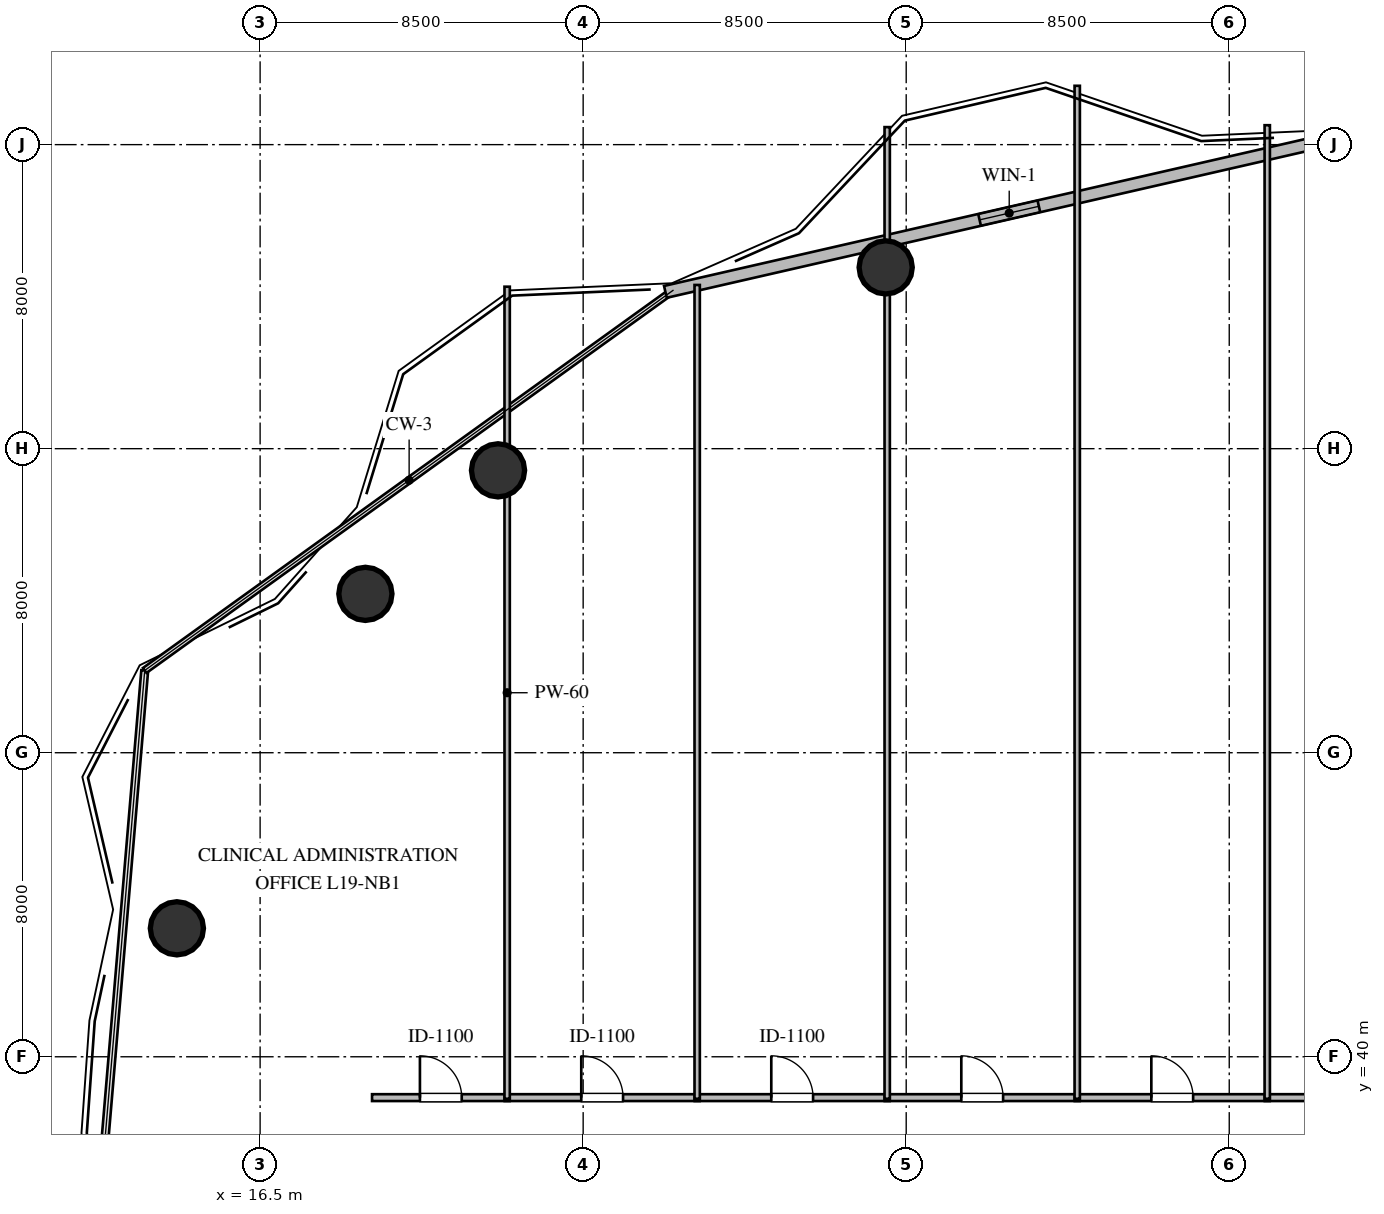
"""IFC4 building model, lengths in metres.
Left out: names, types, materials, properties, quantities, classifications, styles, units other than length and angle.
Written with IfcOpenShell. Run it as: python <this file> out.ifc"""

import sys

from ifc_helpers import new_model, si_unit, direction, frame, frame_2d, origin, origin_2d, place, context, subcontext, project, spatial, rectangle, circle, extrude, element, fill, save


model = new_model("IFC4")
c1 = context("Model", 3, precision=1e-05, world=origin(), true_north=direction((0.0, 1.0)))
c2 = subcontext(c1, "Body", "Model", "MODEL_VIEW")
j1 = project(units=[si_unit("LENGTHUNIT", "METRE"), si_unit("PLANEANGLEUNIT", "RADIAN")], contexts=[c1])
p1 = place(None, origin())
s1 = spatial("IfcSite", under=j1, at=p1, CompositionType="ELEMENT")
p2 = place(p1, origin())
s2 = spatial("IfcBuilding", under=s1, at=p2, CompositionType="ELEMENT")
p3 = place(p2, frame((0.0, 0.0, 74.4)))
s3 = spatial("IfcBuildingStorey", under=s2, at=p3, CompositionType="ELEMENT", Elevation=74.4)
for number, where, z_axis, x_axis in (
    (1, (32.96, 60.77, 0.0), (0.0, 0.0, 1.0), (1.0, 0.0, 0.0)),
    (2, (22.76, 55.43, 0.0), (0.0, 0.0, 1.0), (1.0, 0.0, 0.0)),
    (3, (19.27, 52.18, 0.0), (0.0, 0.0, 1.0), (1.0, 0.0, 0.0)),
    (4, (14.31, 43.38, 0.0), (0.0, 0.0, 1.0), (1.0, 0.0, 0.0)),
):
    element("IfcColumn", number, at=place(p3, frame(where, z_axis=z_axis, x_axis=x_axis)), inside=s3, PredefinedType="COLUMN", context=c2, shape_type="SweptSolid", body=[
        extrude(circle(Radius=0.7, at=origin_2d()), origin(), (0.0, 0.0, 1.0), 3.6),
    ])
p4 = place(p3, frame((27.164, 60.126, 0.0), z_axis=(0.0, 0.0, 1.0), x_axis=(0.974744906433, 0.22332122018, 0.0)))
e5 = element("IfcWall", 5, at=p4, inside=s3, PredefinedType="STANDARD", context=c2, shape_type="SweptSolid", body=[
    extrude(rectangle(XDim=18.561, YDim=0.32, at=frame_2d((9.28, 0.0))), origin(), (0.0, 0.0, 1.0), 3.36),
])
p5 = place(p4, frame((8.481, 0.0, 1.05)))
e6 = element("IfcOpeningElement", 6, at=p5, cuts=e5, PredefinedType="OPENING", context=c2, shape_type="SweptSolid", body=[
    extrude(rectangle(XDim=1.6, YDim=1.5, at=frame_2d((0.8, 0.75))), frame((0.0, 0.17, 0.0), z_axis=(0.0, -1.0, 0.0), x_axis=(1.0, 0.0, 0.0)), (0.0, 0.0, 1.0), 0.34),
])
p6 = place(p3, frame((19.445, 38.925, 0.0), z_axis=(0.0, 0.0, 1.0), x_axis=(1.0, 0.0, 0.0)))
e7 = element("IfcWall", 7, at=p6, inside=s3, PredefinedType="PARTITIONING", context=c2, shape_type="SweptSolid", body=[
    extrude(rectangle(XDim=3.62, YDim=0.18, at=frame_2d((1.81, 0.0))), origin(), (0.0, 0.0, 1.0), 3.36),
])
p7 = place(p6, frame((1.26, 0.0, 0.0)))
e8 = element("IfcOpeningElement", 8, at=p7, cuts=e7, PredefinedType="OPENING", context=c2, shape_type="SweptSolid", body=[
    extrude(rectangle(XDim=1.1, YDim=2.1, at=frame_2d((0.55, 1.05))), frame((0.0, 0.1, 0.0), z_axis=(0.0, -1.0, 0.0), x_axis=(1.0, 0.0, 0.0)), (0.0, 0.0, 1.0), 0.2),
])
p8 = place(p3, frame((22.935, 38.925, 0.0), z_axis=(0.0, 0.0, 1.0), x_axis=(1.0, 0.0, 0.0)))
e9 = element("IfcWall", 9, at=p8, inside=s3, PredefinedType="PARTITIONING", context=c2, shape_type="SweptSolid", body=[
    extrude(rectangle(XDim=5.13, YDim=0.18, at=frame_2d((2.565, 0.0))), origin(), (0.0, 0.0, 1.0), 3.36),
])
p9 = place(p8, frame((2.015, 0.0, 0.0)))
e10 = element("IfcOpeningElement", 10, at=p9, cuts=e9, PredefinedType="OPENING", context=c2, shape_type="SweptSolid", body=[
    extrude(rectangle(XDim=1.1, YDim=2.1, at=frame_2d((0.55, 1.05))), frame((0.0, 0.1, 0.0), z_axis=(0.0, -1.0, 0.0), x_axis=(1.0, 0.0, 0.0)), (0.0, 0.0, 1.0), 0.2),
])
p10 = place(p3, frame((27.935, 38.925, 0.0), z_axis=(0.0, 0.0, 1.0), x_axis=(1.0, 0.0, 0.0)))
e11 = element("IfcWall", 11, at=p10, inside=s3, PredefinedType="PARTITIONING", context=c2, shape_type="SweptSolid", body=[
    extrude(rectangle(XDim=5.13, YDim=0.18, at=frame_2d((2.565, 0.0))), origin(), (0.0, 0.0, 1.0), 3.36),
])
p11 = place(p10, frame((2.015, 0.0, 0.0)))
e12 = element("IfcOpeningElement", 12, at=p11, cuts=e11, PredefinedType="OPENING", context=c2, shape_type="SweptSolid", body=[
    extrude(rectangle(XDim=1.1, YDim=2.1, at=frame_2d((0.55, 1.05))), frame((0.0, 0.1, 0.0), z_axis=(0.0, -1.0, 0.0), x_axis=(1.0, 0.0, 0.0)), (0.0, 0.0, 1.0), 0.2),
])
p12 = place(p3, frame((32.935, 38.925, 0.0), z_axis=(0.0, 0.0, 1.0), x_axis=(1.0, 0.0, 0.0)))
e13 = element("IfcWall", 13, at=p12, inside=s3, PredefinedType="PARTITIONING", context=c2, shape_type="SweptSolid", body=[
    extrude(rectangle(XDim=5.13, YDim=0.18, at=frame_2d((2.565, 0.0))), origin(), (0.0, 0.0, 1.0), 3.36),
])
p13 = place(p12, frame((2.015, 0.0, 0.0)))
e14 = element("IfcOpeningElement", 14, at=p13, cuts=e13, PredefinedType="OPENING", context=c2, shape_type="SweptSolid", body=[
    extrude(rectangle(XDim=1.1, YDim=2.1, at=frame_2d((0.55, 1.05))), frame((0.0, 0.1, 0.0), z_axis=(0.0, -1.0, 0.0), x_axis=(1.0, 0.0, 0.0)), (0.0, 0.0, 1.0), 0.2),
])
p14 = place(p3, frame((37.935, 38.925, 0.0), z_axis=(0.0, 0.0, 1.0), x_axis=(1.0, 0.0, 0.0)))
e15 = element("IfcWall", 15, at=p14, inside=s3, PredefinedType="PARTITIONING", context=c2, shape_type="SweptSolid", body=[
    extrude(rectangle(XDim=5.13, YDim=0.18, at=frame_2d((2.565, 0.0))), origin(), (0.0, 0.0, 1.0), 3.36),
])
p15 = place(p14, frame((2.015, 0.0, 0.0)))
e16 = element("IfcOpeningElement", 16, at=p15, cuts=e15, PredefinedType="OPENING", context=c2, shape_type="SweptSolid", body=[
    extrude(rectangle(XDim=1.1, YDim=2.1, at=frame_2d((0.55, 1.05))), frame((0.0, 0.1, 0.0), z_axis=(0.0, -1.0, 0.0), x_axis=(1.0, 0.0, 0.0)), (0.0, 0.0, 1.0), 0.2),
])
p16 = place(p3, frame((42.935, 38.925, 0.0), z_axis=(0.0, 0.0, 1.0), x_axis=(1.0, 0.0, 0.0)))
e17 = element("IfcWall", 17, at=p16, inside=s3, PredefinedType="PARTITIONING", context=c2, shape_type="SweptSolid", body=[
    extrude(rectangle(XDim=3.62, YDim=0.18, at=frame_2d((1.81, 0.0))), origin(), (0.0, 0.0, 1.0), 3.36),
])
p17 = place(p16, frame((1.26, 0.0, 0.0)))
e18 = element("IfcOpeningElement", 18, at=p17, cuts=e17, PredefinedType="OPENING", context=c2, shape_type="SweptSolid", body=[
    extrude(rectangle(XDim=1.1, YDim=2.1, at=frame_2d((0.55, 1.05))), frame((0.0, 0.1, 0.0), z_axis=(0.0, -1.0, 0.0), x_axis=(1.0, 0.0, 0.0)), (0.0, 0.0, 1.0), 0.2),
])
p18 = place(p3, frame((23.0, 60.262, 0.0), z_axis=(0.0, 0.0, 1.0), x_axis=(0.0, -1.0, 0.0)))
e19 = element("IfcWall", 19, at=p18, inside=s3, PredefinedType="PARTITIONING", context=c2, shape_type="SweptSolid", body=[
    extrude(rectangle(XDim=21.367, YDim=0.14, at=frame_2d((10.684, 0.0))), origin(), (0.0, 0.0, 1.0), 2.89),
])
p19 = place(p3, frame((28.0, 60.308, 0.0), z_axis=(0.0, 0.0, 1.0), x_axis=(0.0, -1.0, 0.0)))
e20 = element("IfcWall", 20, at=p19, inside=s3, PredefinedType="PARTITIONING", context=c2, shape_type="SweptSolid", body=[
    extrude(rectangle(XDim=21.413, YDim=0.14, at=frame_2d((10.706, 0.0))), origin(), (0.0, 0.0, 1.0), 3.36),
])
p20 = place(p3, frame((33.0, 64.461, 0.0), z_axis=(0.0, 0.0, 1.0), x_axis=(0.0, -1.0, 0.0)))
e21 = element("IfcWall", 21, at=p20, inside=s3, PredefinedType="PARTITIONING", context=c2, shape_type="SweptSolid", body=[
    extrude(rectangle(XDim=25.566, YDim=0.14, at=frame_2d((12.783, 0.0))), origin(), (0.0, 0.0, 1.0), 2.89),
])
p21 = place(p3, frame((38.0, 65.548, 0.0), z_axis=(0.0, 0.0, 1.0), x_axis=(0.0, -1.0, 0.0)))
e22 = element("IfcWall", 22, at=p21, inside=s3, PredefinedType="PARTITIONING", context=c2, shape_type="SweptSolid", body=[
    extrude(rectangle(XDim=26.653, YDim=0.14, at=frame_2d((13.327, 0.0))), origin(), (0.0, 0.0, 1.0), 3.36),
])
p22 = place(p3, frame((43.0, 64.511, 0.0), z_axis=(0.0, 0.0, 1.0), x_axis=(0.0, -1.0, 0.0)))
e23 = element("IfcWall", 23, at=p22, inside=s3, PredefinedType="PARTITIONING", context=c2, shape_type="SweptSolid", body=[
    extrude(rectangle(XDim=25.616, YDim=0.14, at=frame_2d((12.808, 0.0))), origin(), (0.0, 0.0, 1.0), 3.36),
])
p23 = place(p5, origin())
e24 = element("IfcWindow", 24, at=p23, inside=s3, PartitioningType="SINGLE_PANEL", PredefinedType="WINDOW", context=c2, shape_type="SweptSolid", body=[
    extrude(rectangle(XDim=1.6, YDim=1.5, at=frame_2d((0.8, 0.75))), frame((0.0, 0.03, 0.0), z_axis=(0.0, -1.0, 0.0), x_axis=(1.0, 0.0, 0.0)), (0.0, 0.0, 1.0), 0.06),
])
fill(e6, e24)
p24 = place(p7, origin())
e25 = element("IfcDoor", 25, at=p24, inside=s3, OperationType="SINGLE_SWING_LEFT", PredefinedType="DOOR", context=c2, shape_type="SweptSolid", body=[
    extrude(rectangle(XDim=1.1, YDim=2.1, at=frame_2d((0.55, 1.05))), frame((0.0, 0.025, 0.0), z_axis=(0.0, -1.0, 0.0), x_axis=(1.0, 0.0, 0.0)), (0.0, 0.0, 1.0), 0.05),
])
fill(e8, e25)
p25 = place(p9, origin())
e26 = element("IfcDoor", 26, at=p25, inside=s3, OperationType="SINGLE_SWING_LEFT", PredefinedType="DOOR", context=c2, shape_type="SweptSolid", body=[
    extrude(rectangle(XDim=1.1, YDim=2.1, at=frame_2d((0.55, 1.05))), frame((0.0, 0.025, 0.0), z_axis=(0.0, -1.0, 0.0), x_axis=(1.0, 0.0, 0.0)), (0.0, 0.0, 1.0), 0.05),
])
fill(e10, e26)
p26 = place(p11, origin())
e27 = element("IfcDoor", 27, at=p26, inside=s3, OperationType="SINGLE_SWING_LEFT", PredefinedType="DOOR", context=c2, shape_type="SweptSolid", body=[
    extrude(rectangle(XDim=1.1, YDim=2.1, at=frame_2d((0.55, 1.05))), frame((0.0, 0.025, 0.0), z_axis=(0.0, -1.0, 0.0), x_axis=(1.0, 0.0, 0.0)), (0.0, 0.0, 1.0), 0.05),
])
fill(e12, e27)
p27 = place(p13, origin())
e28 = element("IfcDoor", 28, at=p27, inside=s3, OperationType="SINGLE_SWING_LEFT", PredefinedType="DOOR", context=c2, shape_type="SweptSolid", body=[
    extrude(rectangle(XDim=1.1, YDim=2.1, at=frame_2d((0.55, 1.05))), frame((0.0, 0.025, 0.0), z_axis=(0.0, -1.0, 0.0), x_axis=(1.0, 0.0, 0.0)), (0.0, 0.0, 1.0), 0.05),
])
fill(e14, e28)
p28 = place(p15, origin())
e29 = element("IfcDoor", 29, at=p28, inside=s3, OperationType="SINGLE_SWING_LEFT", PredefinedType="DOOR", context=c2, shape_type="SweptSolid", body=[
    extrude(rectangle(XDim=1.1, YDim=2.1, at=frame_2d((0.55, 1.05))), frame((0.0, 0.025, 0.0), z_axis=(0.0, -1.0, 0.0), x_axis=(1.0, 0.0, 0.0)), (0.0, 0.0, 1.0), 0.05),
])
fill(e16, e29)
save(model, sys.argv[1])
